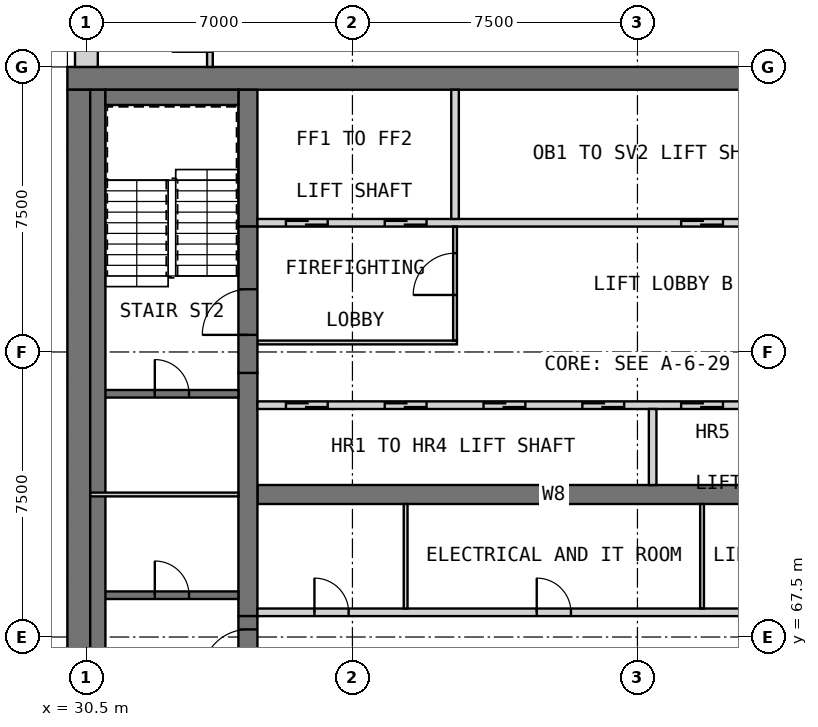
"""IFC4 building model, lengths in metres.
Left out: names, types, materials, properties, quantities, classifications, styles, units other than length and angle.
Written with IfcOpenShell. Run it as: python <this file> out.ifc"""

import sys

from ifc_helpers import new_model, si_unit, direction, frame, frame_2d, origin, place, context, subcontext, project, spatial, rectangle, extrude, element, fill, save


model = new_model("IFC4")
c1 = context("Model", 3, precision=1e-05, world=origin(), true_north=direction((0.0, 1.0)))
c2 = subcontext(c1, "Body", "Model", "MODEL_VIEW")
j1 = project(units=[si_unit("LENGTHUNIT", "METRE"), si_unit("PLANEANGLEUNIT", "RADIAN")], contexts=[c1])
p1 = place(None, origin())
s1 = spatial("IfcSite", under=j1, at=p1, CompositionType="ELEMENT")
p2 = place(p1, origin())
s2 = spatial("IfcBuilding", under=s1, at=p2, CompositionType="ELEMENT")
p3 = place(p2, frame((0.0, 0.0, 219.7)))
s3 = spatial("IfcBuildingStorey", under=s2, at=p3, CompositionType="ELEMENT", Elevation=219.7)
p4 = place(p3, frame((30.0, 82.2, 0.0), z_axis=(0.0, 0.0, 1.0), x_axis=(1.0, 0.0, 0.0)))
e1 = element("IfcWall", 1, at=p4, inside=s3, PredefinedType="SHEAR", context=c2, shape_type="SweptSolid", body=[
    extrude(rectangle(XDim=30.0, YDim=0.6, at=frame_2d((15.0, 0.0))), origin(), (0.0, 0.0, 1.0), 3.5),
])
p5 = place(p3, frame((30.3, 60.6, 0.0), z_axis=(0.0, 0.0, 1.0), x_axis=(0.0, 1.0, 0.0)))
e2 = element("IfcWall", 2, at=p5, inside=s3, PredefinedType="SHEAR", context=c2, shape_type="SweptSolid", body=[
    extrude(rectangle(XDim=21.3, YDim=0.6, at=frame_2d((10.65, 0.0))), origin(), (0.0, 0.0, 1.0), 3.5),
])
p6 = place(p3, frame((35.0, 71.25, 0.0), z_axis=(0.0, 0.0, 1.0), x_axis=(1.0, 0.0, 0.0)))
e3 = element("IfcWall", 3, at=p6, inside=s3, PredefinedType="SHEAR", context=c2, shape_type="SweptSolid", body=[
    extrude(rectangle(XDim=15.6, YDim=0.5, at=frame_2d((7.8, 0.0))), origin(), (0.0, 0.0, 1.0), 3.5),
])
p7 = place(p3, frame((34.75, 68.05, 0.0), z_axis=(0.0, 0.0, 1.0), x_axis=(0.0, 1.0, 0.0)))
e4 = element("IfcWall", 4, at=p7, inside=s3, PredefinedType="SHEAR", context=c2, shape_type="SweptSolid", body=[
    extrude(rectangle(XDim=6.4, YDim=0.5, at=frame_2d((3.2, 0.0))), origin(), (0.0, 0.0, 1.0), 3.5),
])
p8 = place(p3, frame((34.75, 78.3, 0.0), z_axis=(0.0, 0.0, 1.0), x_axis=(0.0, 1.0, 0.0)))
e5 = element("IfcWall", 5, at=p8, inside=s3, PredefinedType="SHEAR", context=c2, shape_type="SweptSolid", body=[
    extrude(rectangle(XDim=3.6, YDim=0.5, at=frame_2d((1.8, 0.0))), origin(), (0.0, 0.0, 1.0), 3.5),
])
p9 = place(p2, frame((0.0, 0.0, 34.0)))
s4 = spatial("IfcBuildingStorey", under=s2, at=p9, CompositionType="ELEMENT", Elevation=34.0)
for number, where, z_axis, x_axis in (
    (6, (29.7, 70.8, 0.0), (0.0, 0.0, 1.0), (0.0, 1.0, 0.0)),
    (7, (29.7, 75.675, 0.0), (0.0, 0.0, 1.0), (0.0, 1.0, 0.0)),
    (8, (29.7, 80.55, 0.0), (0.0, 0.0, 1.0), (0.0, 1.0, 0.0)),
):
    element("IfcWall", number, at=place(p9, frame(where, z_axis=z_axis, x_axis=x_axis)), inside=s4, PredefinedType="SOLIDWALL", context=c2, shape_type="SweptSolid", body=[
        extrude(rectangle(XDim=0.9, YDim=0.6, at=frame_2d((0.45, 0.0))), origin(), (0.0, 0.0, 1.0), 286.2),
    ])
p10 = place(p3, frame((30.5, 89.5, 0.0), z_axis=(0.0, 0.0, 1.0), x_axis=(0.0, -1.0, 0.0)))
e9 = element("IfcWall", 9, at=p10, inside=s3, PredefinedType="SOLIDWALL", context=c2, shape_type="SweptSolid", body=[
    extrude(rectangle(XDim=7.0, YDim=0.6, at=frame_2d((3.5, 0.0))), origin(), (0.0, 0.0, 1.0), 3.25),
])
p11 = place(p10, frame((3.925, 0.0, 0.8)))
e10 = element("IfcOpeningElement", 10, at=p11, cuts=e9, PredefinedType="OPENING", context=c2, shape_type="SweptSolid", body=[
    extrude(rectangle(XDim=2.4, YDim=1.8, at=frame_2d((1.2, 0.9))), frame((0.0, 0.31, 0.0), z_axis=(0.0, -1.0, 0.0), x_axis=(1.0, 0.0, 0.0)), (0.0, 0.0, 1.0), 0.62),
])
p12 = place(p10, frame((0.425, 0.0, 0.8)))
e11 = element("IfcOpeningElement", 11, at=p12, cuts=e9, PredefinedType="OPENING", context=c2, shape_type="SweptSolid", body=[
    extrude(rectangle(XDim=2.4, YDim=1.8, at=frame_2d((1.2, 0.9))), frame((0.0, 0.31, 0.0), z_axis=(0.0, -1.0, 0.0), x_axis=(1.0, 0.0, 0.0)), (0.0, 0.0, 1.0), 0.62),
])
p13 = place(p3, frame((35.0, 68.15, 0.0), z_axis=(0.0, 0.0, 1.0), x_axis=(1.0, 0.0, 0.0)))
e12 = element("IfcWall", 12, at=p13, inside=s3, PredefinedType="PARTITIONING", context=c2, shape_type="SweptSolid", body=[
    extrude(rectangle(XDim=15.6, YDim=0.2, at=frame_2d((7.8, 0.0))), origin(), (0.0, 0.0, 1.0), 3.25),
])
p14 = place(p13, frame((1.5, 0.0, 0.0)))
e13 = element("IfcOpeningElement", 13, at=p14, cuts=e12, PredefinedType="OPENING", context=c2, shape_type="SweptSolid", body=[
    extrude(rectangle(XDim=0.9, YDim=2.1, at=frame_2d((0.45, 1.05))), frame((0.0, 0.11, 0.0), z_axis=(0.0, -1.0, 0.0), x_axis=(1.0, 0.0, 0.0)), (0.0, 0.0, 1.0), 0.22),
])
p15 = place(p13, frame((7.35, 0.0, 0.0)))
e14 = element("IfcOpeningElement", 14, at=p15, cuts=e12, PredefinedType="OPENING", context=c2, shape_type="SweptSolid", body=[
    extrude(rectangle(XDim=0.9, YDim=2.1, at=frame_2d((0.45, 1.05))), frame((0.0, 0.11, 0.0), z_axis=(0.0, -1.0, 0.0), x_axis=(1.0, 0.0, 0.0)), (0.0, 0.0, 1.0), 0.22),
])
p16 = place(p13, frame((13.2, 0.0, 0.0)))
e15 = element("IfcOpeningElement", 15, at=p16, cuts=e12, PredefinedType="OPENING", context=c2, shape_type="SweptSolid", body=[
    extrude(rectangle(XDim=0.9, YDim=2.1, at=frame_2d((0.45, 1.05))), frame((0.0, 0.11, 0.0), z_axis=(0.0, -1.0, 0.0), x_axis=(1.0, 0.0, 0.0)), (0.0, 0.0, 1.0), 0.22),
])
for number, where, z_axis, x_axis in (
    (16, (38.9, 68.25, 0.0), (0.0, 0.0, 1.0), (0.0, 1.0, 0.0)),
    (17, (46.7, 68.25, 0.0), (0.0, 0.0, 1.0), (0.0, 1.0, 0.0)),
):
    element("IfcWall", number, at=place(p3, frame(where, z_axis=z_axis, x_axis=x_axis)), inside=s3, PredefinedType="PARTITIONING", context=c2, shape_type="SweptSolid", body=[
        extrude(rectangle(XDim=2.75, YDim=0.1, at=frame_2d((1.375, 0.0))), origin(), (0.0, 0.0, 1.0), 3.25),
    ])
p17 = place(p3, frame((35.0, 73.6, 0.0), z_axis=(0.0, 0.0, 1.0), x_axis=(1.0, 0.0, 0.0)))
e18 = element("IfcWall", 18, at=p17, inside=s3, PredefinedType="SOLIDWALL", context=c2, shape_type="SweptSolid", body=[
    extrude(rectangle(XDim=15.6, YDim=0.2, at=frame_2d((7.8, 0.0))), origin(), (0.0, 0.0, 1.0), 3.5),
])
p18 = place(p17, frame((0.75, 0.0, 0.0)))
e19 = element("IfcOpeningElement", 19, at=p18, cuts=e18, PredefinedType="OPENING", context=c2, shape_type="SweptSolid", body=[
    extrude(rectangle(XDim=1.1, YDim=2.1, at=frame_2d((0.55, 1.05))), frame((0.0, 0.11, 0.0), z_axis=(0.0, -1.0, 0.0), x_axis=(1.0, 0.0, 0.0)), (0.0, 0.0, 1.0), 0.22),
])
p19 = place(p17, frame((3.35, 0.0, 0.0)))
e20 = element("IfcOpeningElement", 20, at=p19, cuts=e18, PredefinedType="OPENING", context=c2, shape_type="SweptSolid", body=[
    extrude(rectangle(XDim=1.1, YDim=2.1, at=frame_2d((0.55, 1.05))), frame((0.0, 0.11, 0.0), z_axis=(0.0, -1.0, 0.0), x_axis=(1.0, 0.0, 0.0)), (0.0, 0.0, 1.0), 0.22),
])
p20 = place(p17, frame((5.95, 0.0, 0.0)))
e21 = element("IfcOpeningElement", 21, at=p20, cuts=e18, PredefinedType="OPENING", context=c2, shape_type="SweptSolid", body=[
    extrude(rectangle(XDim=1.1, YDim=2.1, at=frame_2d((0.55, 1.05))), frame((0.0, 0.11, 0.0), z_axis=(0.0, -1.0, 0.0), x_axis=(1.0, 0.0, 0.0)), (0.0, 0.0, 1.0), 0.22),
])
p21 = place(p17, frame((8.55, 0.0, 0.0)))
e22 = element("IfcOpeningElement", 22, at=p21, cuts=e18, PredefinedType="OPENING", context=c2, shape_type="SweptSolid", body=[
    extrude(rectangle(XDim=1.1, YDim=2.1, at=frame_2d((0.55, 1.05))), frame((0.0, 0.11, 0.0), z_axis=(0.0, -1.0, 0.0), x_axis=(1.0, 0.0, 0.0)), (0.0, 0.0, 1.0), 0.22),
])
p22 = place(p17, frame((11.15, 0.0, 0.0)))
e23 = element("IfcOpeningElement", 23, at=p22, cuts=e18, PredefinedType="OPENING", context=c2, shape_type="SweptSolid", body=[
    extrude(rectangle(XDim=1.1, YDim=2.1, at=frame_2d((0.55, 1.05))), frame((0.0, 0.11, 0.0), z_axis=(0.0, -1.0, 0.0), x_axis=(1.0, 0.0, 0.0)), (0.0, 0.0, 1.0), 0.22),
])
p23 = place(p17, frame((13.75, 0.0, 0.0)))
e24 = element("IfcOpeningElement", 24, at=p23, cuts=e18, PredefinedType="OPENING", context=c2, shape_type="SweptSolid", body=[
    extrude(rectangle(XDim=1.1, YDim=2.1, at=frame_2d((0.55, 1.05))), frame((0.0, 0.11, 0.0), z_axis=(0.0, -1.0, 0.0), x_axis=(1.0, 0.0, 0.0)), (0.0, 0.0, 1.0), 0.22),
])
p24 = place(p3, frame((45.4, 71.5, 0.0), z_axis=(0.0, 0.0, 1.0), x_axis=(0.0, 1.0, 0.0)))
e25 = element("IfcWall", 25, at=p24, inside=s3, PredefinedType="SOLIDWALL", context=c2, shape_type="SweptSolid", body=[
    extrude(rectangle(XDim=2.0, YDim=0.2, at=frame_2d((1.0, 0.0))), origin(), (0.0, 0.0, 1.0), 3.5),
])
p25 = place(p3, frame((35.0, 78.4, 0.0), z_axis=(0.0, 0.0, 1.0), x_axis=(1.0, 0.0, 0.0)))
e26 = element("IfcWall", 26, at=p25, inside=s3, PredefinedType="SOLIDWALL", context=c2, shape_type="SweptSolid", body=[
    extrude(rectangle(XDim=15.6, YDim=0.2, at=frame_2d((7.8, 0.0))), origin(), (0.0, 0.0, 1.0), 3.5),
])
p26 = place(p25, frame((0.75, 0.0, 0.0)))
e27 = element("IfcOpeningElement", 27, at=p26, cuts=e26, PredefinedType="OPENING", context=c2, shape_type="SweptSolid", body=[
    extrude(rectangle(XDim=1.1, YDim=2.1, at=frame_2d((0.55, 1.05))), frame((0.0, 0.11, 0.0), z_axis=(0.0, -1.0, 0.0), x_axis=(1.0, 0.0, 0.0)), (0.0, 0.0, 1.0), 0.22),
])
p27 = place(p25, frame((3.35, 0.0, 0.0)))
e28 = element("IfcOpeningElement", 28, at=p27, cuts=e26, PredefinedType="OPENING", context=c2, shape_type="SweptSolid", body=[
    extrude(rectangle(XDim=1.1, YDim=2.1, at=frame_2d((0.55, 1.05))), frame((0.0, 0.11, 0.0), z_axis=(0.0, -1.0, 0.0), x_axis=(1.0, 0.0, 0.0)), (0.0, 0.0, 1.0), 0.22),
])
p28 = place(p25, frame((11.15, 0.0, 0.0)))
e29 = element("IfcOpeningElement", 29, at=p28, cuts=e26, PredefinedType="OPENING", context=c2, shape_type="SweptSolid", body=[
    extrude(rectangle(XDim=1.1, YDim=2.1, at=frame_2d((0.55, 1.05))), frame((0.0, 0.11, 0.0), z_axis=(0.0, -1.0, 0.0), x_axis=(1.0, 0.0, 0.0)), (0.0, 0.0, 1.0), 0.22),
])
p29 = place(p25, frame((13.75, 0.0, 0.0)))
e30 = element("IfcOpeningElement", 30, at=p29, cuts=e26, PredefinedType="OPENING", context=c2, shape_type="SweptSolid", body=[
    extrude(rectangle(XDim=1.1, YDim=2.1, at=frame_2d((0.55, 1.05))), frame((0.0, 0.11, 0.0), z_axis=(0.0, -1.0, 0.0), x_axis=(1.0, 0.0, 0.0)), (0.0, 0.0, 1.0), 0.22),
])
p30 = place(p3, frame((40.2, 78.5, 0.0), z_axis=(0.0, 0.0, 1.0), x_axis=(0.0, 1.0, 0.0)))
e31 = element("IfcWall", 31, at=p30, inside=s3, PredefinedType="SOLIDWALL", context=c2, shape_type="SweptSolid", body=[
    extrude(rectangle(XDim=3.4, YDim=0.2, at=frame_2d((1.7, 0.0))), origin(), (0.0, 0.0, 1.0), 3.5),
])
p31 = place(p3, frame((35.0, 75.25, 0.0), z_axis=(0.0, 0.0, 1.0), x_axis=(1.0, 0.0, 0.0)))
e32 = element("IfcWall", 32, at=p31, inside=s3, PredefinedType="PARTITIONING", context=c2, shape_type="SweptSolid", body=[
    extrude(rectangle(XDim=5.25, YDim=0.1, at=frame_2d((2.625, 0.0))), origin(), (0.0, 0.0, 1.0), 3.25),
])
p32 = place(p3, frame((40.2, 75.3, 0.0), z_axis=(0.0, 0.0, 1.0), x_axis=(0.0, 1.0, 0.0)))
e33 = element("IfcWall", 33, at=p32, inside=s3, PredefinedType="PARTITIONING", context=c2, shape_type="SweptSolid", body=[
    extrude(rectangle(XDim=3.0, YDim=0.1, at=frame_2d((1.5, 0.0))), origin(), (0.0, 0.0, 1.0), 3.25),
])
p33 = place(p32, frame((1.2, 0.0, 0.0)))
e34 = element("IfcOpeningElement", 34, at=p33, cuts=e33, PredefinedType="OPENING", context=c2, shape_type="SweptSolid", body=[
    extrude(rectangle(XDim=1.1, YDim=2.1, at=frame_2d((0.55, 1.05))), frame((0.0, 0.06, 0.0), z_axis=(0.0, -1.0, 0.0), x_axis=(1.0, 0.0, 0.0)), (0.0, 0.0, 1.0), 0.12),
])
p34 = place(p3, frame((34.75, 64.2, 0.0), z_axis=(0.0, 0.0, 1.0), x_axis=(0.0, 1.0, 0.0)))
e35 = element("IfcWall", 35, at=p34, inside=s3, PredefinedType="SOLIDWALL", context=c2, shape_type="SweptSolid", body=[
    extrude(rectangle(XDim=3.85, YDim=0.5, at=frame_2d((1.925, 0.0))), origin(), (0.0, 0.0, 1.0), 2.3),
])
p35 = place(p34, frame((2.3, 0.0, 0.0)))
e36 = element("IfcOpeningElement", 36, at=p35, cuts=e35, PredefinedType="OPENING", context=c2, shape_type="SweptSolid", body=[
    extrude(rectangle(XDim=1.2, YDim=2.1, at=frame_2d((0.6, 1.05))), frame((0.0, 0.26, 0.0), z_axis=(0.0, -1.0, 0.0), x_axis=(1.0, 0.0, 0.0)), (0.0, 0.0, 1.0), 0.52),
])
p36 = place(p3, frame((34.75, 74.45, 0.0), z_axis=(0.0, 0.0, 1.0), x_axis=(0.0, 1.0, 0.0)))
e37 = element("IfcWall", 37, at=p36, inside=s3, PredefinedType="SOLIDWALL", context=c2, shape_type="SweptSolid", body=[
    extrude(rectangle(XDim=3.85, YDim=0.5, at=frame_2d((1.925, 0.0))), origin(), (0.0, 0.0, 1.0), 2.3),
])
p37 = place(p36, frame((1.0, 0.0, 0.0)))
e38 = element("IfcOpeningElement", 38, at=p37, cuts=e37, PredefinedType="OPENING", context=c2, shape_type="SweptSolid", body=[
    extrude(rectangle(XDim=1.2, YDim=2.1, at=frame_2d((0.6, 1.05))), frame((0.0, 0.26, 0.0), z_axis=(0.0, -1.0, 0.0), x_axis=(1.0, 0.0, 0.0)), (0.0, 0.0, 1.0), 0.52),
])
p38 = place(p3, frame((30.6, 68.6, 0.0), z_axis=(0.0, 0.0, 1.0), x_axis=(1.0, 0.0, 0.0)))
e39 = element("IfcWall", 39, at=p38, inside=s3, PredefinedType="SOLIDWALL", context=c2, shape_type="SweptSolid", body=[
    extrude(rectangle(XDim=3.9, YDim=0.2, at=frame_2d((1.95, 0.0))), origin(), (0.0, 0.0, 1.0), 3.25),
])
p39 = place(p38, frame((1.7, 0.0, 0.0)))
e40 = element("IfcOpeningElement", 40, at=p39, cuts=e39, PredefinedType="OPENING", context=c2, shape_type="SweptSolid", body=[
    extrude(rectangle(XDim=0.9, YDim=2.1, at=frame_2d((0.45, 1.05))), frame((0.0, 0.11, 0.0), z_axis=(0.0, -1.0, 0.0), x_axis=(1.0, 0.0, 0.0)), (0.0, 0.0, 1.0), 0.22),
])
p40 = place(p3, frame((30.6, 73.9, 0.0), z_axis=(0.0, 0.0, 1.0), x_axis=(1.0, 0.0, 0.0)))
e41 = element("IfcWall", 41, at=p40, inside=s3, PredefinedType="SOLIDWALL", context=c2, shape_type="SweptSolid", body=[
    extrude(rectangle(XDim=3.9, YDim=0.2, at=frame_2d((1.95, 0.0))), origin(), (0.0, 0.0, 1.0), 3.25),
])
p41 = place(p40, frame((1.7, 0.0, 0.0)))
e42 = element("IfcOpeningElement", 42, at=p41, cuts=e41, PredefinedType="OPENING", context=c2, shape_type="SweptSolid", body=[
    extrude(rectangle(XDim=0.9, YDim=2.1, at=frame_2d((0.45, 1.05))), frame((0.0, 0.11, 0.0), z_axis=(0.0, -1.0, 0.0), x_axis=(1.0, 0.0, 0.0)), (0.0, 0.0, 1.0), 0.22),
])
p42 = place(p3, frame((30.8, 60.6, 0.0), z_axis=(0.0, 0.0, 1.0), x_axis=(0.0, 1.0, 0.0)))
e43 = element("IfcWall", 43, at=p42, inside=s3, PredefinedType="SOLIDWALL", context=c2, shape_type="SweptSolid", body=[
    extrude(rectangle(XDim=21.3, YDim=0.4, at=frame_2d((10.65, 0.0))), origin(), (0.0, 0.0, 1.0), 3.25),
])
p43 = place(p3, frame((31.0, 81.7, 0.0), z_axis=(0.0, 0.0, 1.0), x_axis=(1.0, 0.0, 0.0)))
e44 = element("IfcWall", 44, at=p43, inside=s3, PredefinedType="SOLIDWALL", context=c2, shape_type="SweptSolid", body=[
    extrude(rectangle(XDim=3.5, YDim=0.4, at=frame_2d((1.75, 0.0))), origin(), (0.0, 0.0, 1.0), 3.25),
])
p44 = place(p3, frame((30.6, 71.25, 0.0), z_axis=(0.0, 0.0, 1.0), x_axis=(1.0, 0.0, 0.0)))
e45 = element("IfcWall", 45, at=p44, inside=s3, PredefinedType="PARTITIONING", context=c2, shape_type="SweptSolid", body=[
    extrude(rectangle(XDim=3.9, YDim=0.1, at=frame_2d((1.95, 0.0))), origin(), (0.0, 0.0, 1.0), 3.25),
])
p45 = place(p3, frame((33.75, 82.5, 0.0), z_axis=(0.0, 0.0, 1.0), x_axis=(0.0, 1.0, 0.0)))
e46 = element("IfcWall", 46, at=p45, inside=s3, PredefinedType="PARTITIONING", context=c2, shape_type="SweptSolid", body=[
    extrude(rectangle(XDim=1.725, YDim=0.15, at=frame_2d((0.863, 0.0))), origin(), (0.0, 0.0, 1.0), 3.25),
])
p46 = place(p45, frame((0.4, 0.0, 0.0)))
e47 = element("IfcOpeningElement", 47, at=p46, cuts=e46, PredefinedType="OPENING", context=c2, shape_type="SweptSolid", body=[
    extrude(rectangle(XDim=1.0, YDim=2.1, at=frame_2d((0.5, 1.05))), frame((0.0, 0.085, 0.0), z_axis=(0.0, -1.0, 0.0), x_axis=(1.0, 0.0, 0.0)), (0.0, 0.0, 1.0), 0.17),
])
p47 = place(p14, origin())
e48 = element("IfcDoor", 48, at=p47, inside=s3, OperationType="SINGLE_SWING_RIGHT", PredefinedType="DOOR", context=c2, shape_type="SweptSolid", body=[
    extrude(rectangle(XDim=0.9, YDim=2.1, at=frame_2d((0.45, 1.05))), frame((0.0, 0.025, 0.0), z_axis=(0.0, -1.0, 0.0), x_axis=(1.0, 0.0, 0.0)), (0.0, 0.0, 1.0), 0.05),
])
fill(e13, e48)
p48 = place(p15, origin())
e49 = element("IfcDoor", 49, at=p48, inside=s3, OperationType="SINGLE_SWING_LEFT", PredefinedType="DOOR", context=c2, shape_type="SweptSolid", body=[
    extrude(rectangle(XDim=0.9, YDim=2.1, at=frame_2d((0.45, 1.05))), frame((0.0, 0.025, 0.0), z_axis=(0.0, -1.0, 0.0), x_axis=(1.0, 0.0, 0.0)), (0.0, 0.0, 1.0), 0.05),
])
fill(e14, e49)
p49 = place(p18, origin())
e50 = element("IfcDoor", 50, at=p49, inside=s3, OperationType="DOUBLE_DOOR_SLIDING", PredefinedType="DOOR", context=c2, shape_type="SweptSolid", body=[
    extrude(rectangle(XDim=1.1, YDim=2.1, at=frame_2d((0.55, 1.05))), frame((0.0, 0.025, 0.0), z_axis=(0.0, -1.0, 0.0), x_axis=(1.0, 0.0, 0.0)), (0.0, 0.0, 1.0), 0.05),
])
fill(e19, e50)
p50 = place(p19, origin())
e51 = element("IfcDoor", 51, at=p50, inside=s3, OperationType="DOUBLE_DOOR_SLIDING", PredefinedType="DOOR", context=c2, shape_type="SweptSolid", body=[
    extrude(rectangle(XDim=1.1, YDim=2.1, at=frame_2d((0.55, 1.05))), frame((0.0, 0.025, 0.0), z_axis=(0.0, -1.0, 0.0), x_axis=(1.0, 0.0, 0.0)), (0.0, 0.0, 1.0), 0.05),
])
fill(e20, e51)
p51 = place(p20, origin())
e52 = element("IfcDoor", 52, at=p51, inside=s3, OperationType="DOUBLE_DOOR_SLIDING", PredefinedType="DOOR", context=c2, shape_type="SweptSolid", body=[
    extrude(rectangle(XDim=1.1, YDim=2.1, at=frame_2d((0.55, 1.05))), frame((0.0, 0.025, 0.0), z_axis=(0.0, -1.0, 0.0), x_axis=(1.0, 0.0, 0.0)), (0.0, 0.0, 1.0), 0.05),
])
fill(e21, e52)
p52 = place(p21, origin())
e53 = element("IfcDoor", 53, at=p52, inside=s3, OperationType="DOUBLE_DOOR_SLIDING", PredefinedType="DOOR", context=c2, shape_type="SweptSolid", body=[
    extrude(rectangle(XDim=1.1, YDim=2.1, at=frame_2d((0.55, 1.05))), frame((0.0, 0.025, 0.0), z_axis=(0.0, -1.0, 0.0), x_axis=(1.0, 0.0, 0.0)), (0.0, 0.0, 1.0), 0.05),
])
fill(e22, e53)
p53 = place(p22, origin())
e54 = element("IfcDoor", 54, at=p53, inside=s3, OperationType="DOUBLE_DOOR_SLIDING", PredefinedType="DOOR", context=c2, shape_type="SweptSolid", body=[
    extrude(rectangle(XDim=1.1, YDim=2.1, at=frame_2d((0.55, 1.05))), frame((0.0, 0.025, 0.0), z_axis=(0.0, -1.0, 0.0), x_axis=(1.0, 0.0, 0.0)), (0.0, 0.0, 1.0), 0.05),
])
fill(e23, e54)
p54 = place(p26, origin())
e55 = element("IfcDoor", 55, at=p54, inside=s3, OperationType="DOUBLE_DOOR_SLIDING", PredefinedType="DOOR", context=c2, shape_type="SweptSolid", body=[
    extrude(rectangle(XDim=1.1, YDim=2.1, at=frame_2d((0.55, 1.05))), frame((0.0, 0.025, 0.0), z_axis=(0.0, -1.0, 0.0), x_axis=(1.0, 0.0, 0.0)), (0.0, 0.0, 1.0), 0.05),
])
fill(e27, e55)
p55 = place(p27, origin())
e56 = element("IfcDoor", 56, at=p55, inside=s3, OperationType="DOUBLE_DOOR_SLIDING", PredefinedType="DOOR", context=c2, shape_type="SweptSolid", body=[
    extrude(rectangle(XDim=1.1, YDim=2.1, at=frame_2d((0.55, 1.05))), frame((0.0, 0.025, 0.0), z_axis=(0.0, -1.0, 0.0), x_axis=(1.0, 0.0, 0.0)), (0.0, 0.0, 1.0), 0.05),
])
fill(e28, e56)
p56 = place(p28, origin())
e57 = element("IfcDoor", 57, at=p56, inside=s3, OperationType="DOUBLE_DOOR_SLIDING", PredefinedType="DOOR", context=c2, shape_type="SweptSolid", body=[
    extrude(rectangle(XDim=1.1, YDim=2.1, at=frame_2d((0.55, 1.05))), frame((0.0, 0.025, 0.0), z_axis=(0.0, -1.0, 0.0), x_axis=(1.0, 0.0, 0.0)), (0.0, 0.0, 1.0), 0.05),
])
fill(e29, e57)
p57 = place(p33, origin())
e58 = element("IfcDoor", 58, at=p57, inside=s3, OperationType="SINGLE_SWING_LEFT", PredefinedType="DOOR", context=c2, shape_type="SweptSolid", body=[
    extrude(rectangle(XDim=1.1, YDim=2.1, at=frame_2d((0.55, 1.05))), frame((0.0, 0.025, 0.0), z_axis=(0.0, -1.0, 0.0), x_axis=(1.0, 0.0, 0.0)), (0.0, 0.0, 1.0), 0.05),
])
fill(e34, e58)
p58 = place(p35, origin())
e59 = element("IfcDoor", 59, at=p58, inside=s3, OperationType="SINGLE_SWING_LEFT", PredefinedType="DOOR", context=c2, shape_type="SweptSolid", body=[
    extrude(rectangle(XDim=1.2, YDim=2.1, at=frame_2d((0.6, 1.05))), frame((0.0, 0.025, 0.0), z_axis=(0.0, -1.0, 0.0), x_axis=(1.0, 0.0, 0.0)), (0.0, 0.0, 1.0), 0.05),
])
fill(e36, e59)
p59 = place(p37, origin())
e60 = element("IfcDoor", 60, at=p59, inside=s3, OperationType="SINGLE_SWING_RIGHT", PredefinedType="DOOR", context=c2, shape_type="SweptSolid", body=[
    extrude(rectangle(XDim=1.2, YDim=2.1, at=frame_2d((0.6, 1.05))), frame((0.0, 0.025, 0.0), z_axis=(0.0, -1.0, 0.0), x_axis=(1.0, 0.0, 0.0)), (0.0, 0.0, 1.0), 0.05),
])
fill(e38, e60)
p60 = place(p39, origin())
e61 = element("IfcDoor", 61, at=p60, inside=s3, OperationType="SINGLE_SWING_LEFT", PredefinedType="DOOR", context=c2, shape_type="SweptSolid", body=[
    extrude(rectangle(XDim=0.9, YDim=2.1, at=frame_2d((0.45, 1.05))), frame((0.0, 0.025, 0.0), z_axis=(0.0, -1.0, 0.0), x_axis=(1.0, 0.0, 0.0)), (0.0, 0.0, 1.0), 0.05),
])
fill(e40, e61)
p61 = place(p41, origin())
e62 = element("IfcDoor", 62, at=p61, inside=s3, OperationType="SINGLE_SWING_RIGHT", PredefinedType="DOOR", context=c2, shape_type="SweptSolid", body=[
    extrude(rectangle(XDim=0.9, YDim=2.1, at=frame_2d((0.45, 1.05))), frame((0.0, 0.025, 0.0), z_axis=(0.0, -1.0, 0.0), x_axis=(1.0, 0.0, 0.0)), (0.0, 0.0, 1.0), 0.05),
])
fill(e42, e62)
save(model, sys.argv[1])
